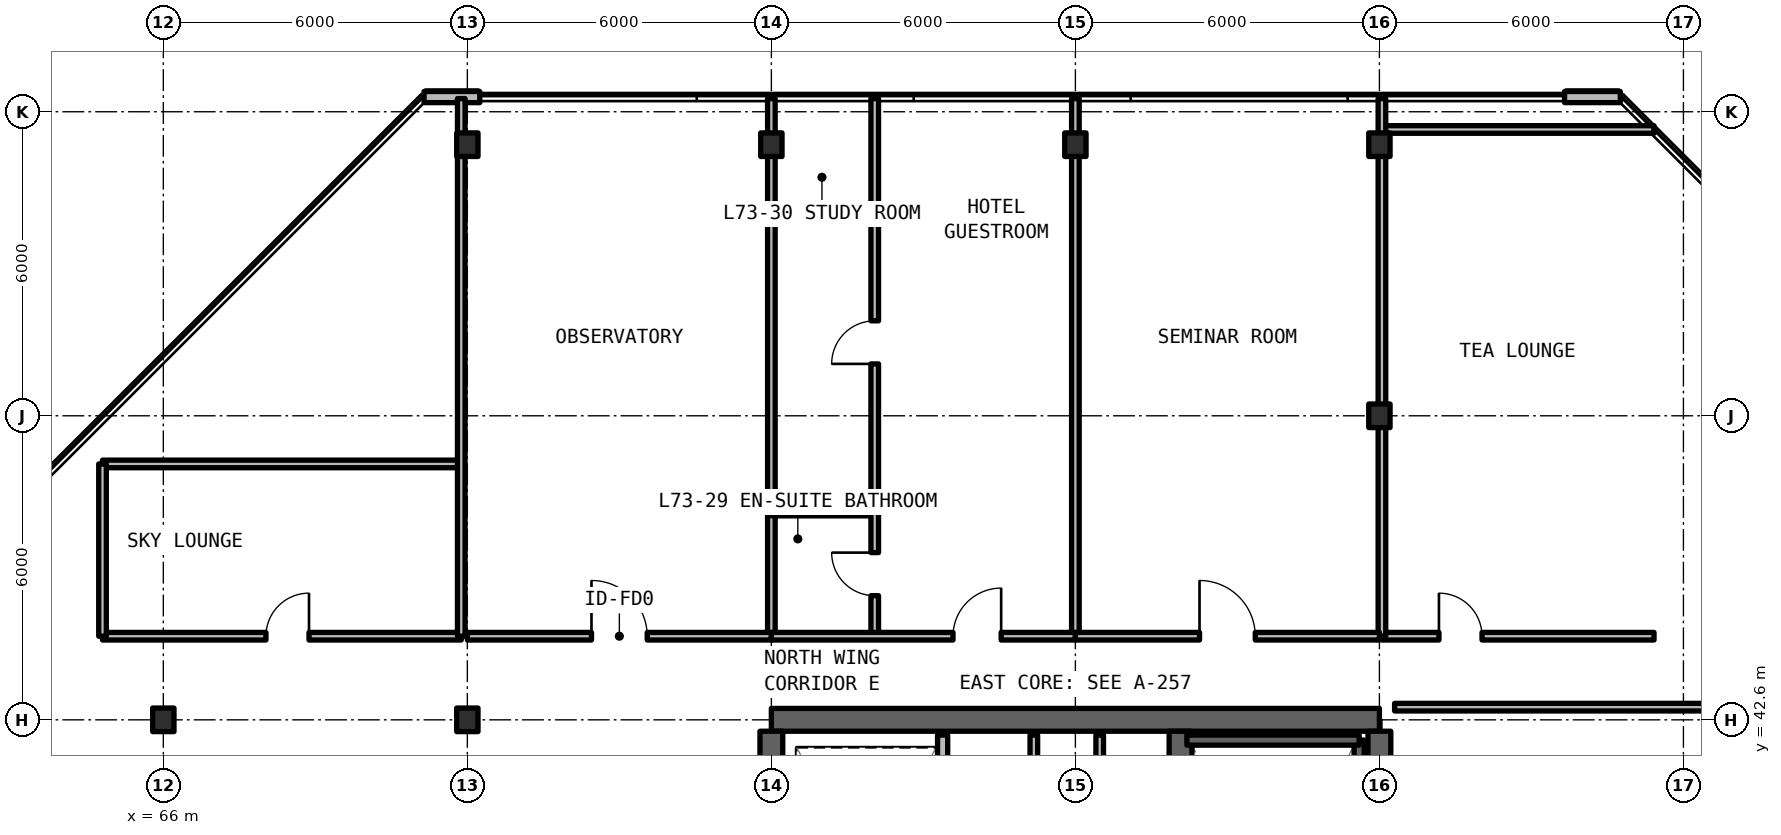
"""IFC4 building model, lengths in metres.
Left out: names, types, materials, properties, quantities, classifications, styles, units other than length and angle.
Written with IfcOpenShell. Run it as: python <this file> out.ifc"""

import sys

from ifc_helpers import new_model, si_unit, direction, frame, frame_2d, origin, origin_2d, place, context, subcontext, project, spatial, rectangle, i_section, extrude, element, fill, save


model = new_model("IFC4")
c1 = context("Model", 3, precision=1e-05, world=origin(), true_north=direction((0.0, 1.0)))
c2 = subcontext(c1, "Body", "Model", "MODEL_VIEW")
j1 = project(units=[si_unit("LENGTHUNIT", "METRE"), si_unit("PLANEANGLEUNIT", "RADIAN")], contexts=[c1])
p1 = place(None, origin())
s1 = spatial("IfcSite", under=j1, at=p1, CompositionType="ELEMENT")
p2 = place(p1, origin())
s2 = spatial("IfcBuilding", under=s1, at=p2, CompositionType="ELEMENT")
p3 = place(p2, frame((0.0, 0.0, 260.7)))
s3 = spatial("IfcBuildingStorey", under=s2, at=p3, CompositionType="ELEMENT", Elevation=260.7)
p4 = place(p3, frame((90.0, 42.6, 0.0), z_axis=(0.0, 0.0, 1.0), x_axis=(-1.0, 0.0, 0.0)))
e1 = element("IfcWall", 1, at=p4, inside=s3, PredefinedType="SHEAR", context=c2, shape_type="SweptSolid", body=[
    extrude(rectangle(XDim=12.0, YDim=0.45, at=frame_2d((6.0, 0.0))), origin(), (0.0, 0.0, 1.0), 3.63),
])
p5 = place(p3, frame((90.0, 24.825, 0.0), z_axis=(0.0, 0.0, 1.0), x_axis=(0.0, 1.0, 0.0)))
e2 = element("IfcWall", 2, at=p5, inside=s3, PredefinedType="SHEAR", context=c2, shape_type="SweptSolid", body=[
    extrude(rectangle(XDim=17.55, YDim=0.45, at=frame_2d((8.775, 0.0))), origin(), (0.0, 0.0, 1.0), 3.63),
])
p6 = place(p3, frame((78.0, 36.8, 0.0), z_axis=(0.0, 0.0, 1.0), x_axis=(0.0, 1.0, 0.0)))
e3 = element("IfcWall", 3, at=p6, inside=s3, PredefinedType="SHEAR", context=c2, shape_type="SweptSolid", body=[
    extrude(rectangle(XDim=5.575, YDim=0.45, at=frame_2d((2.788, 0.0))), origin(), (0.0, 0.0, 1.0), 3.63),
])
p7 = place(p3, frame((86.075, 24.825, 0.0), z_axis=(0.0, 0.0, 1.0), x_axis=(0.0, 1.0, 0.0)))
e4 = element("IfcWall", 4, at=p7, inside=s3, PredefinedType="SHEAR", context=c2, shape_type="SweptSolid", body=[
    extrude(rectangle(XDim=17.55, YDim=0.45, at=frame_2d((8.775, 0.0))), origin(), (0.0, 0.0, 1.0), 3.63),
])
p8 = place(p7, frame((0.425, 0.0, 0.0)))
e5 = element("IfcOpeningElement", 5, at=p8, cuts=e4, PredefinedType="OPENING", context=c2, shape_type="SweptSolid", body=[
    extrude(rectangle(XDim=1.15, YDim=2.15, at=frame_2d((0.575, 1.075))), frame((0.0, 0.235, 0.0), z_axis=(0.0, -1.0, 0.0), x_axis=(1.0, 0.0, 0.0)), (0.0, 0.0, 1.0), 0.47),
])
p9 = place(p7, frame((9.625, 0.0, 0.0)))
e6 = element("IfcOpeningElement", 6, at=p9, cuts=e4, PredefinedType="OPENING", context=c2, shape_type="SweptSolid", body=[
    extrude(rectangle(XDim=1.15, YDim=2.15, at=frame_2d((0.575, 1.075))), frame((0.0, 0.235, 0.0), z_axis=(0.0, -1.0, 0.0), x_axis=(1.0, 0.0, 0.0)), (0.0, 0.0, 1.0), 0.47),
])
for number, where, z_axis, x_axis in (
    (7, (66.0, 42.6, 0.0), (0.0, 0.0, 1.0), (1.0, 0.0, 0.0)),
    (8, (72.0, 42.6, 0.0), (0.0, 0.0, 1.0), (1.0, 0.0, 0.0)),
    (9, (90.0, 48.6, 0.0), (0.0, 0.0, 1.0), (1.0, 0.0, 0.0)),
    (10, (72.0, 53.95, 0.0), (0.0, 0.0, 1.0), (1.0, 0.0, 0.0)),
    (11, (78.0, 53.95, 0.0), (0.0, 0.0, 1.0), (1.0, 0.0, 0.0)),
    (12, (84.0, 53.95, 0.0), (0.0, 0.0, 1.0), (1.0, 0.0, 0.0)),
    (13, (90.0, 53.95, 0.0), (0.0, 0.0, 1.0), (1.0, 0.0, 0.0)),
):
    element("IfcColumn", number, at=place(p3, frame(where, z_axis=z_axis, x_axis=x_axis)), inside=s3, PredefinedType="COLUMN", context=c2, shape_type="SweptSolid", body=[
        extrude(i_section(OverallWidth=0.421, OverallDepth=0.465, WebThickness=0.045, FlangeThickness=0.07, FilletRadius=0.015, at=origin_2d()), origin(), (0.0, 0.0, 1.0), 3.63),
    ])
for number, where, z_axis, x_axis in (
    (14, (94.754, 54.89, 0.0), (0.0, 0.0, 1.0), (-1.0, 0.0, 0.0)),
    (15, (72.246, 54.89, 0.0), (0.0, 0.0, 1.0), (-1.0, 0.0, 0.0)),
):
    element("IfcWall", number, at=place(p3, frame(where, z_axis=z_axis, x_axis=x_axis)), inside=s3, PredefinedType="SOLIDWALL", context=c2, shape_type="SweptSolid", body=[
        extrude(rectangle(XDim=1.1, YDim=0.22, at=frame_2d((0.55, 0.0))), origin(), (0.0, 0.0, 1.0), 3.41),
    ])
p10 = place(p3, frame((84.48, 36.88, 0.0), z_axis=(0.0, 0.0, 1.0), x_axis=(0.0, 1.0, 0.0)))
e16 = element("IfcWall", 16, at=p10, inside=s3, PredefinedType="SOLIDWALL", context=c2, shape_type="SweptSolid", body=[
    extrude(rectangle(XDim=5.42, YDim=0.15, at=frame_2d((2.71, 0.0))), origin(), (0.0, 0.0, 1.0), 2.63),
])
p11 = place(p3, frame((83.18, 36.88, 0.0), z_axis=(0.0, 0.0, 1.0), x_axis=(0.0, 1.0, 0.0)))
e17 = element("IfcWall", 17, at=p11, inside=s3, PredefinedType="SOLIDWALL", context=c2, shape_type="SweptSolid", body=[
    extrude(rectangle(XDim=5.42, YDim=0.15, at=frame_2d((2.71, 0.0))), origin(), (0.0, 0.0, 1.0), 2.63),
])
p12 = place(p11, frame((2.1, 0.0, 0.0)))
e18 = element("IfcOpeningElement", 18, at=p12, cuts=e17, PredefinedType="OPENING", context=c2, shape_type="SweptSolid", body=[
    extrude(rectangle(XDim=0.95, YDim=2.15, at=frame_2d((0.475, 1.075))), frame((0.0, 0.085, 0.0), z_axis=(0.0, -1.0, 0.0), x_axis=(1.0, 0.0, 0.0)), (0.0, 0.0, 1.0), 0.17),
])
p13 = place(p3, frame((81.38, 36.88, 0.0), z_axis=(0.0, 0.0, 1.0), x_axis=(0.0, 1.0, 0.0)))
e19 = element("IfcWall", 19, at=p13, inside=s3, PredefinedType="SOLIDWALL", context=c2, shape_type="SweptSolid", body=[
    extrude(rectangle(XDim=5.42, YDim=0.2, at=frame_2d((2.71, 0.0))), origin(), (0.0, 0.0, 1.0), 2.63),
])
p14 = place(p13, frame((0.8, 0.0, 0.0)))
e20 = element("IfcOpeningElement", 20, at=p14, cuts=e19, PredefinedType="OPENING", context=c2, shape_type="SweptSolid", body=[
    extrude(rectangle(XDim=1.1, YDim=2.2, at=frame_2d((0.55, 1.1))), frame((0.0, 0.11, 0.0), z_axis=(0.0, -1.0, 0.0), x_axis=(1.0, 0.0, 0.0)), (0.0, 0.0, 1.0), 0.22),
])
p15 = place(p13, frame((3.3, 0.0, 0.0)))
e21 = element("IfcOpeningElement", 21, at=p15, cuts=e19, PredefinedType="OPENING", context=c2, shape_type="SweptSolid", body=[
    extrude(rectangle(XDim=1.1, YDim=2.2, at=frame_2d((0.55, 1.1))), frame((0.0, 0.11, 0.0), z_axis=(0.0, -1.0, 0.0), x_axis=(1.0, 0.0, 0.0)), (0.0, 0.0, 1.0), 0.22),
])
p16 = place(p3, frame((64.8, 44.25, 0.0), z_axis=(0.0, 0.0, 1.0), x_axis=(1.0, 0.0, 0.0)))
e22 = element("IfcWall", 22, at=p16, inside=s3, PredefinedType="SOLIDWALL", context=c2, shape_type="SweptSolid", body=[
    extrude(rectangle(XDim=7.08, YDim=0.15, at=frame_2d((3.54, 0.0))), origin(), (0.0, 0.0, 1.0), 2.63),
])
p17 = place(p16, frame((3.225, 0.0, 0.0)))
e23 = element("IfcOpeningElement", 23, at=p17, cuts=e22, PredefinedType="OPENING", context=c2, shape_type="SweptSolid", body=[
    extrude(rectangle(XDim=0.85, YDim=2.1, at=frame_2d((0.425, 1.05))), frame((0.0, 0.085, 0.0), z_axis=(0.0, -1.0, 0.0), x_axis=(1.0, 0.0, 0.0)), (0.0, 0.0, 1.0), 0.17),
])
p18 = place(p3, frame((64.8, 47.65, 0.0), z_axis=(0.0, 0.0, 1.0), x_axis=(1.0, 0.0, 0.0)))
e24 = element("IfcWall", 24, at=p18, inside=s3, PredefinedType="SOLIDWALL", context=c2, shape_type="SweptSolid", body=[
    extrude(rectangle(XDim=7.08, YDim=0.15, at=frame_2d((3.54, 0.0))), origin(), (0.0, 0.0, 1.0), 2.63),
])
p19 = place(p3, frame((64.8, 44.25, 0.0), z_axis=(0.0, 0.0, 1.0), x_axis=(0.0, 1.0, 0.0)))
e25 = element("IfcWall", 25, at=p19, inside=s3, PredefinedType="SOLIDWALL", context=c2, shape_type="SweptSolid", body=[
    extrude(rectangle(XDim=3.4, YDim=0.15, at=frame_2d((1.7, 0.0))), origin(), (0.0, 0.0, 1.0), 2.63),
])
p20 = place(p3, frame((71.88, 44.25, 0.0), z_axis=(0.0, 0.0, 1.0), x_axis=(0.0, 1.0, 0.0)))
e26 = element("IfcWall", 26, at=p20, inside=s3, PredefinedType="SOLIDWALL", context=c2, shape_type="SweptSolid", body=[
    extrude(rectangle(XDim=10.61, YDim=0.15, at=frame_2d((5.305, 0.0))), origin(), (0.0, 0.0, 1.0), 2.63),
])
p21 = place(p3, frame((90.3, 42.85, 0.0), z_axis=(0.0, 0.0, 1.0), x_axis=(1.0, 0.0, 0.0)))
e27 = element("IfcWall", 27, at=p21, inside=s3, PredefinedType="SOLIDWALL", context=c2, shape_type="SweptSolid", body=[
    extrude(rectangle(XDim=8.52, YDim=0.15, at=frame_2d((4.26, 0.0))), origin(), (0.0, 0.0, 1.0), 2.63),
])
p22 = place(p3, frame((90.05, 44.25, 0.0), z_axis=(0.0, 0.0, 1.0), x_axis=(1.0, 0.0, 0.0)))
e28 = element("IfcWall", 28, at=p22, inside=s3, PredefinedType="SOLIDWALL", context=c2, shape_type="SweptSolid", body=[
    extrude(rectangle(XDim=5.37, YDim=0.15, at=frame_2d((2.685, 0.0))), origin(), (0.0, 0.0, 1.0), 2.63),
])
p23 = place(p22, frame((1.125, 0.0, 0.0)))
e29 = element("IfcOpeningElement", 29, at=p23, cuts=e28, PredefinedType="OPENING", context=c2, shape_type="SweptSolid", body=[
    extrude(rectangle(XDim=0.85, YDim=2.1, at=frame_2d((0.425, 1.05))), frame((0.0, 0.085, 0.0), z_axis=(0.0, -1.0, 0.0), x_axis=(1.0, 0.0, 0.0)), (0.0, 0.0, 1.0), 0.17),
])
p24 = place(p3, frame((90.05, 54.25, 0.0), z_axis=(0.0, 0.0, 1.0), x_axis=(1.0, 0.0, 0.0)))
e30 = element("IfcWall", 30, at=p24, inside=s3, PredefinedType="SOLIDWALL", context=c2, shape_type="SweptSolid", body=[
    extrude(rectangle(XDim=5.37, YDim=0.15, at=frame_2d((2.685, 0.0))), origin(), (0.0, 0.0, 1.0), 2.63),
])
for number, where, z_axis, x_axis in (
    (31, (90.05, 44.25, 0.0), (0.0, 0.0, 1.0), (0.0, 1.0, 0.0)),
    (32, (78.0, 44.25, 0.0), (0.0, 0.0, 1.0), (0.0, 1.0, 0.0)),
):
    element("IfcWall", number, at=place(p3, frame(where, z_axis=z_axis, x_axis=x_axis)), inside=s3, PredefinedType="SOLIDWALL", context=c2, shape_type="SweptSolid", body=[
        extrude(rectangle(XDim=10.61, YDim=0.15, at=frame_2d((5.305, 0.0))), origin(), (0.0, 0.0, 1.0), 2.63),
    ])
p25 = place(p3, frame((72.0, 44.25, 0.0), z_axis=(0.0, 0.0, 1.0), x_axis=(1.0, 0.0, 0.0)))
e33 = element("IfcWall", 33, at=p25, inside=s3, PredefinedType="SOLIDWALL", context=c2, shape_type="SweptSolid", body=[
    extrude(rectangle(XDim=6.0, YDim=0.15, at=frame_2d((3.0, 0.0))), origin(), (0.0, 0.0, 1.0), 2.63),
])
p26 = place(p25, frame((2.45, 0.0, 0.0)))
e34 = element("IfcOpeningElement", 34, at=p26, cuts=e33, PredefinedType="OPENING", context=c2, shape_type="SweptSolid", body=[
    extrude(rectangle(XDim=1.1, YDim=2.15, at=frame_2d((0.55, 1.075))), frame((0.0, 0.085, 0.0), z_axis=(0.0, -1.0, 0.0), x_axis=(1.0, 0.0, 0.0)), (0.0, 0.0, 1.0), 0.17),
])
p27 = place(p3, frame((84.0, 44.25, 0.0), z_axis=(0.0, 0.0, 1.0), x_axis=(0.0, 1.0, 0.0)))
e35 = element("IfcWall", 35, at=p27, inside=s3, PredefinedType="SOLIDWALL", context=c2, shape_type="SweptSolid", body=[
    extrude(rectangle(XDim=10.61, YDim=0.15, at=frame_2d((5.305, 0.0))), origin(), (0.0, 0.0, 1.0), 2.63),
])
p28 = place(p3, frame((78.0, 46.7, 0.0), z_axis=(0.0, 0.0, 1.0), x_axis=(1.0, 0.0, 0.0)))
e36 = element("IfcWall", 36, at=p28, inside=s3, PredefinedType="PARTITIONING", context=c2, shape_type="SweptSolid", body=[
    extrude(rectangle(XDim=2.04, YDim=0.15, at=frame_2d((1.02, 0.0))), origin(), (0.0, 0.0, 1.0), 2.63),
])
p29 = place(p3, frame((80.04, 44.25, 0.0), z_axis=(0.0, 0.0, 1.0), x_axis=(0.0, 1.0, 0.0)))
e37 = element("IfcWall", 37, at=p29, inside=s3, PredefinedType="PARTITIONING", context=c2, shape_type="SweptSolid", body=[
    extrude(rectangle(XDim=10.61, YDim=0.15, at=frame_2d((5.305, 0.0))), origin(), (0.0, 0.0, 1.0), 2.63),
])
p30 = place(p29, frame((0.8, 0.0, 0.0)))
e38 = element("IfcOpeningElement", 38, at=p30, cuts=e37, PredefinedType="OPENING", context=c2, shape_type="SweptSolid", body=[
    extrude(rectangle(XDim=0.85, YDim=2.1, at=frame_2d((0.425, 1.05))), frame((0.0, 0.085, 0.0), z_axis=(0.0, -1.0, 0.0), x_axis=(1.0, 0.0, 0.0)), (0.0, 0.0, 1.0), 0.17),
])
p31 = place(p29, frame((5.374, 0.0, 0.0)))
e39 = element("IfcOpeningElement", 39, at=p31, cuts=e37, PredefinedType="OPENING", context=c2, shape_type="SweptSolid", body=[
    extrude(rectangle(XDim=0.85, YDim=2.1, at=frame_2d((0.425, 1.05))), frame((0.0, 0.085, 0.0), z_axis=(0.0, -1.0, 0.0), x_axis=(1.0, 0.0, 0.0)), (0.0, 0.0, 1.0), 0.17),
])
p32 = place(p3, frame((78.0, 44.25, 0.0), z_axis=(0.0, 0.0, 1.0), x_axis=(1.0, 0.0, 0.0)))
e40 = element("IfcWall", 40, at=p32, inside=s3, PredefinedType="SOLIDWALL", context=c2, shape_type="SweptSolid", body=[
    extrude(rectangle(XDim=6.0, YDim=0.15, at=frame_2d((3.0, 0.0))), origin(), (0.0, 0.0, 1.0), 2.63),
])
p33 = place(p32, frame((3.585, 0.0, 0.0)))
e41 = element("IfcOpeningElement", 41, at=p33, cuts=e40, PredefinedType="OPENING", context=c2, shape_type="SweptSolid", body=[
    extrude(rectangle(XDim=0.95, YDim=2.15, at=frame_2d((0.475, 1.075))), frame((0.0, 0.085, 0.0), z_axis=(0.0, -1.0, 0.0), x_axis=(1.0, 0.0, 0.0)), (0.0, 0.0, 1.0), 0.17),
])
p34 = place(p3, frame((84.0, 44.25, 0.0), z_axis=(0.0, 0.0, 1.0), x_axis=(1.0, 0.0, 0.0)))
e42 = element("IfcWall", 42, at=p34, inside=s3, PredefinedType="SOLIDWALL", context=c2, shape_type="SweptSolid", body=[
    extrude(rectangle(XDim=6.0, YDim=0.15, at=frame_2d((3.0, 0.0))), origin(), (0.0, 0.0, 1.0), 2.63),
])
p35 = place(p34, frame((2.45, 0.0, 0.0)))
e43 = element("IfcOpeningElement", 43, at=p35, cuts=e42, PredefinedType="OPENING", context=c2, shape_type="SweptSolid", body=[
    extrude(rectangle(XDim=1.1, YDim=2.15, at=frame_2d((0.55, 1.075))), frame((0.0, 0.085, 0.0), z_axis=(0.0, -1.0, 0.0), x_axis=(1.0, 0.0, 0.0)), (0.0, 0.0, 1.0), 0.17),
])
p36 = place(p3, frame((89.6, 34.2, 0.0), z_axis=(0.0, 0.0, 1.0), x_axis=(0.0, 1.0, 0.0)))
e44 = element("IfcWall", 44, at=p36, inside=s3, PredefinedType="SOLIDWALL", context=c2, shape_type="SweptSolid", body=[
    extrude(rectangle(XDim=8.0, YDim=0.2, at=frame_2d((4.0, 0.0))), origin(), (0.0, 0.0, 1.0), 3.63),
])
p37 = place(p3, frame((89.6, 42.2, 0.0), z_axis=(0.0, 0.0, 1.0), x_axis=(-1.0, 0.0, 0.0)))
e45 = element("IfcWall", 45, at=p37, inside=s3, PredefinedType="SOLIDWALL", context=c2, shape_type="SweptSolid", body=[
    extrude(rectangle(XDim=3.4, YDim=0.2, at=frame_2d((1.7, 0.0))), origin(), (0.0, 0.0, 1.0), 3.63),
])
p38 = place(p17, origin())
e46 = element("IfcDoor", 46, at=p38, inside=s3, OperationType="SINGLE_SWING_RIGHT", PredefinedType="DOOR", context=c2, shape_type="SweptSolid", body=[
    extrude(rectangle(XDim=0.85, YDim=2.1, at=frame_2d((0.425, 1.05))), frame((0.0, 0.025, 0.0), z_axis=(0.0, -1.0, 0.0), x_axis=(1.0, 0.0, 0.0)), (0.0, 0.0, 1.0), 0.05),
])
fill(e23, e46)
p39 = place(p23, origin())
e47 = element("IfcDoor", 47, at=p39, inside=s3, OperationType="SINGLE_SWING_LEFT", PredefinedType="DOOR", context=c2, shape_type="SweptSolid", body=[
    extrude(rectangle(XDim=0.85, YDim=2.1, at=frame_2d((0.425, 1.05))), frame((0.0, 0.025, 0.0), z_axis=(0.0, -1.0, 0.0), x_axis=(1.0, 0.0, 0.0)), (0.0, 0.0, 1.0), 0.05),
])
fill(e29, e47)
p40 = place(p26, origin())
e48 = element("IfcDoor", 48, at=p40, inside=s3, OperationType="SINGLE_SWING_LEFT", PredefinedType="DOOR", context=c2, shape_type="SweptSolid", body=[
    extrude(rectangle(XDim=1.1, YDim=2.15, at=frame_2d((0.55, 1.075))), frame((0.0, 0.025, 0.0), z_axis=(0.0, -1.0, 0.0), x_axis=(1.0, 0.0, 0.0)), (0.0, 0.0, 1.0), 0.05),
])
fill(e34, e48)
p41 = place(p30, origin())
e49 = element("IfcDoor", 49, at=p41, inside=s3, OperationType="SINGLE_SWING_RIGHT", PredefinedType="DOOR", context=c2, shape_type="SweptSolid", body=[
    extrude(rectangle(XDim=0.85, YDim=2.1, at=frame_2d((0.425, 1.05))), frame((0.0, 0.025, 0.0), z_axis=(0.0, -1.0, 0.0), x_axis=(1.0, 0.0, 0.0)), (0.0, 0.0, 1.0), 0.05),
])
fill(e38, e49)
p42 = place(p31, origin())
e50 = element("IfcDoor", 50, at=p42, inside=s3, OperationType="SINGLE_SWING_LEFT", PredefinedType="DOOR", context=c2, shape_type="SweptSolid", body=[
    extrude(rectangle(XDim=0.85, YDim=2.1, at=frame_2d((0.425, 1.05))), frame((0.0, 0.025, 0.0), z_axis=(0.0, -1.0, 0.0), x_axis=(1.0, 0.0, 0.0)), (0.0, 0.0, 1.0), 0.05),
])
fill(e39, e50)
p43 = place(p33, origin())
e51 = element("IfcDoor", 51, at=p43, inside=s3, OperationType="SINGLE_SWING_RIGHT", PredefinedType="DOOR", context=c2, shape_type="SweptSolid", body=[
    extrude(rectangle(XDim=0.95, YDim=2.15, at=frame_2d((0.475, 1.075))), frame((0.0, 0.025, 0.0), z_axis=(0.0, -1.0, 0.0), x_axis=(1.0, 0.0, 0.0)), (0.0, 0.0, 1.0), 0.05),
])
fill(e41, e51)
p44 = place(p35, origin())
e52 = element("IfcDoor", 52, at=p44, inside=s3, OperationType="SINGLE_SWING_LEFT", PredefinedType="DOOR", context=c2, shape_type="SweptSolid", body=[
    extrude(rectangle(XDim=1.1, YDim=2.15, at=frame_2d((0.55, 1.075))), frame((0.0, 0.025, 0.0), z_axis=(0.0, -1.0, 0.0), x_axis=(1.0, 0.0, 0.0)), (0.0, 0.0, 1.0), 0.05),
])
fill(e43, e52)
save(model, sys.argv[1])
